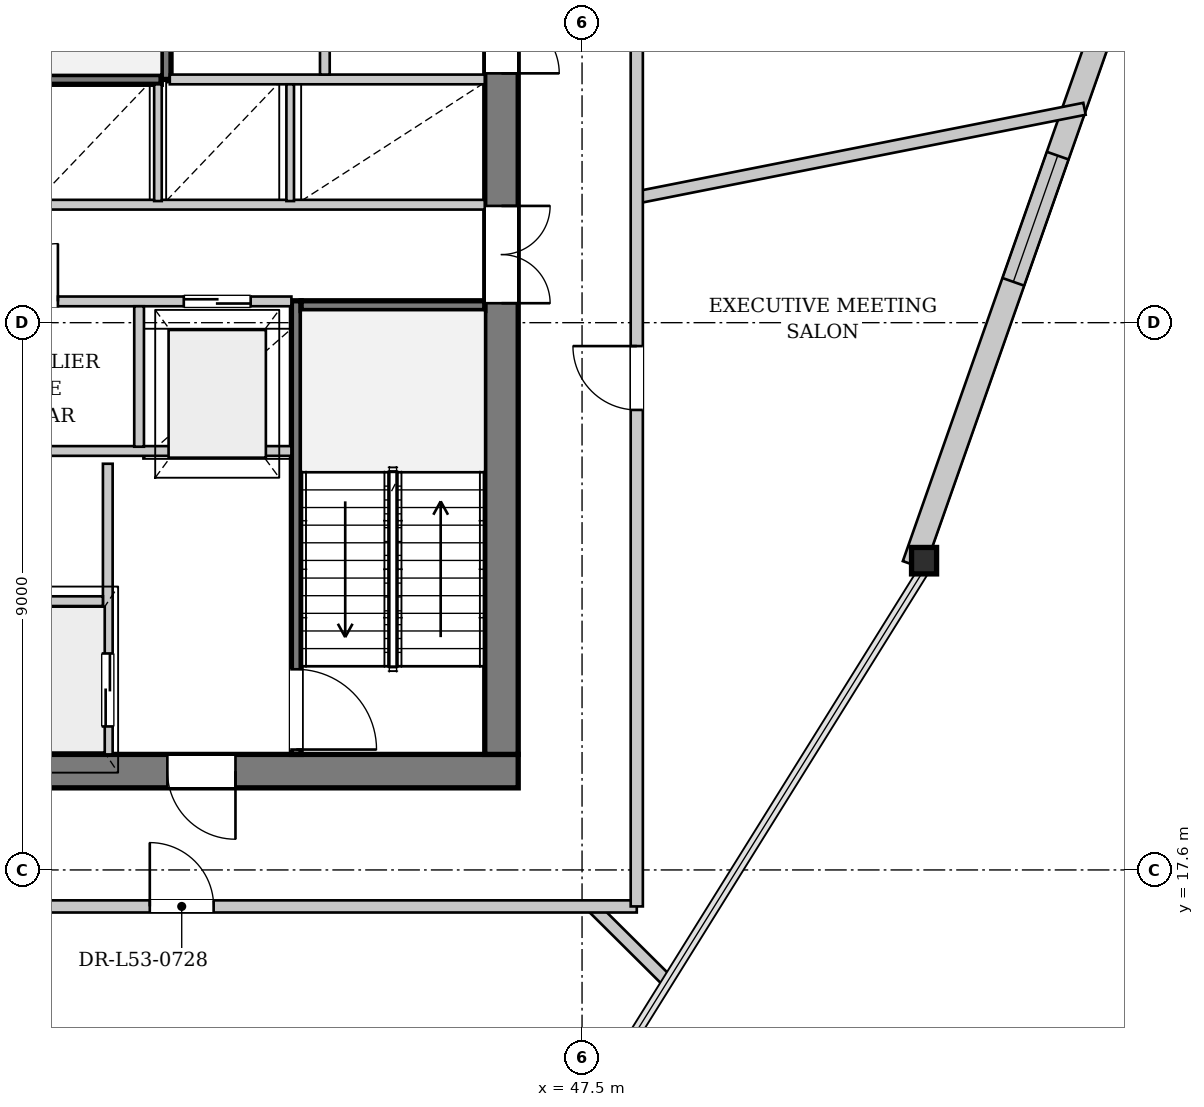
"""IFC4 building model, lengths in metres.
Left out: names, types, materials, properties, quantities, classifications, styles, units other than length and angle.
Written with IfcOpenShell. Run it as: python <this file> out.ifc"""

import sys

from ifc_helpers import new_model, si_unit, direction, frame, frame_2d, origin, origin_2d, place, context, subcontext, project, spatial, rectangle, i_section, extrude, source, transform, mapped, element, fill, save


model = new_model("IFC4")
c1 = context("Model", 3, precision=1e-05, world=origin(), true_north=direction((0.0, 1.0)))
c2 = subcontext(c1, "Body", "Model", "MODEL_VIEW")
j1 = project(units=[si_unit("LENGTHUNIT", "METRE"), si_unit("PLANEANGLEUNIT", "RADIAN")], contexts=[c1])
p1 = place(None, origin())
s1 = spatial("IfcSite", under=j1, at=p1, CompositionType="ELEMENT")
p2 = place(p1, origin())
s2 = spatial("IfcBuilding", under=s1, at=p2, CompositionType="ELEMENT")
p3 = place(p2, frame((0.0, 0.0, 200.3)))
s3 = spatial("IfcBuildingStorey", under=s2, at=p3, CompositionType="ELEMENT", Elevation=200.3)
m1 = source(origin(), c2, "Body", "SweptSolid", [
    extrude(i_section(OverallWidth=0.412, OverallDepth=0.435, WebThickness=0.031, FlangeThickness=0.05, at=origin_2d()), origin(), (0.0, 0.0, 1.0), 3.844),
])
p4 = place(p3, frame((53.134, 22.552, 0.0), z_axis=(-0.004953606094, 0.06935048531, 0.997580057927), x_axis=(-0.997458699831, -0.071247049988, 0.0)))
e1 = element("IfcColumn", 1, at=p4, inside=s3, PredefinedType="COLUMN", context=c2, shape_type="MappedRepresentation", body=[
    mapped(m1, transform((0.0, 0.0, 0.0), x_axis=(1.0, 0.0, 0.0), y_axis=(0.0, 1.0, 0.0), z_axis=(0.0, 0.0, 1.0), scale=1.0)),
])
p5 = place(p3, frame((60.64, 44.466, 0.0), z_axis=(0.0, 0.0, 1.0), x_axis=(-0.331792792619, -0.94335228985, 0.0)))
e2 = element("IfcWall", 2, at=p5, inside=s3, PredefinedType="SOLIDWALL", context=c2, shape_type="SweptSolid", body=[
    extrude(rectangle(XDim=23.163, YDim=0.38, at=frame_2d((11.582, 0.0))), origin(), (0.0, 0.0, 1.0), 2.972),
])
p6 = place(p5, frame((5.386, 0.0, 0.602)))
e3 = element("IfcOpeningElement", 3, at=p6, cuts=e2, PredefinedType="OPENING", context=c2, shape_type="SweptSolid", body=[
    extrude(rectangle(XDim=2.2, YDim=2.25, at=frame_2d((1.1, 1.125))), frame((0.0, 0.2, 0.0), z_axis=(0.0, -1.0, 0.0), x_axis=(1.0, 0.0, 0.0)), (0.0, 0.0, 1.0), 0.4),
])
p7 = place(p5, frame((16.027, 0.0, 0.602)))
e4 = element("IfcOpeningElement", 4, at=p7, cuts=e2, PredefinedType="OPENING", context=c2, shape_type="SweptSolid", body=[
    extrude(rectangle(XDim=2.2, YDim=2.25, at=frame_2d((1.1, 1.125))), frame((0.0, 0.2, 0.0), z_axis=(0.0, -1.0, 0.0), x_axis=(1.0, 0.0, 0.0)), (0.0, 0.0, 1.0), 0.4),
])
p8 = place(p3, frame((46.45, 19.225, 0.0), z_axis=(0.0, 0.0, 1.0), x_axis=(-1.0, 0.0, 0.0)))
e5 = element("IfcWall", 5, at=p8, inside=s3, PredefinedType="SHEAR", context=c2, shape_type="SweptSolid", body=[
    extrude(rectangle(XDim=16.9, YDim=0.55, at=frame_2d((8.45, 0.0))), origin(), (0.0, 0.0, 1.0), 3.58),
])
p9 = place(p8, frame((4.65, 0.0, 0.0)))
e6 = element("IfcOpeningElement", 6, at=p9, cuts=e5, PredefinedType="OPENING", context=c2, shape_type="SweptSolid", body=[
    extrude(rectangle(XDim=1.12, YDim=2.25, at=frame_2d((0.56, 1.125))), frame((0.0, 0.285, 0.0), z_axis=(0.0, -1.0, 0.0), x_axis=(1.0, 0.0, 0.0)), (0.0, 0.0, 1.0), 0.57),
])
p10 = place(p8, frame((11.15, 0.0, 0.0)))
e7 = element("IfcOpeningElement", 7, at=p10, cuts=e5, PredefinedType="OPENING", context=c2, shape_type="SweptSolid", body=[
    extrude(rectangle(XDim=1.12, YDim=2.25, at=frame_2d((0.56, 1.125))), frame((0.0, 0.285, 0.0), z_axis=(0.0, -1.0, 0.0), x_axis=(1.0, 0.0, 0.0)), (0.0, 0.0, 1.0), 0.57),
])
p11 = place(p3, frame((46.175, 33.7, 0.0), z_axis=(0.0, 0.0, 1.0), x_axis=(0.0, -1.0, 0.0)))
e8 = element("IfcWall", 8, at=p11, inside=s3, PredefinedType="SHEAR", context=c2, shape_type="SweptSolid", body=[
    extrude(rectangle(XDim=14.2, YDim=0.55, at=frame_2d((7.1, 0.0))), origin(), (0.0, 0.0, 1.0), 3.58),
])
p12 = place(p11, frame((5.18, 0.0, 0.0)))
e9 = element("IfcOpeningElement", 9, at=p12, cuts=e8, PredefinedType="OPENING", context=c2, shape_type="SweptSolid", body=[
    extrude(rectangle(XDim=1.6, YDim=2.2, at=frame_2d((0.8, 1.1))), frame((0.0, 0.285, 0.0), z_axis=(0.0, -1.0, 0.0), x_axis=(1.0, 0.0, 0.0)), (0.0, 0.0, 1.0), 0.57),
])
p13 = place(p11, frame((2.05, 0.0, 0.0)))
e10 = element("IfcOpeningElement", 10, at=p13, cuts=e8, PredefinedType="OPENING", context=c2, shape_type="SweptSolid", body=[
    extrude(rectangle(XDim=0.95, YDim=2.1, at=frame_2d((0.475, 1.05))), frame((0.0, 0.285, 0.0), z_axis=(0.0, -1.0, 0.0), x_axis=(1.0, 0.0, 0.0)), (0.0, 0.0, 1.0), 0.57),
])
p14 = place(p3, frame((42.8, 26.96, 0.0), z_axis=(0.0, 0.0, 1.0), x_axis=(0.0, -1.0, 0.0)))
e11 = element("IfcWall", 11, at=p14, inside=s3, PredefinedType="PARTITIONING", context=c2, shape_type="SweptSolid", body=[
    extrude(rectangle(XDim=7.46, YDim=0.16, at=frame_2d((3.73, 0.0))), origin(), (0.0, 0.0, 1.0), 3.58),
])
p15 = place(p14, frame((6.06, 0.0, 0.0)))
e12 = element("IfcOpeningElement", 12, at=p15, cuts=e11, PredefinedType="OPENING", context=c2, shape_type="SweptSolid", body=[
    extrude(rectangle(XDim=1.32, YDim=2.2, at=frame_2d((0.66, 1.1))), frame((0.0, 0.09, 0.0), z_axis=(0.0, -1.0, 0.0), x_axis=(1.0, 0.0, 0.0)), (0.0, 0.0, 1.0), 0.18),
])
p16 = place(p3, frame((42.88, 26.88, 0.0), z_axis=(0.0, 0.0, 1.0), x_axis=(1.0, 0.0, 0.0)))
e13 = element("IfcWall", 13, at=p16, inside=s3, PredefinedType="PARTITIONING", context=c2, shape_type="SweptSolid", body=[
    extrude(rectangle(XDim=3.02, YDim=0.16, at=frame_2d((1.51, 0.0))), origin(), (0.0, 0.0, 1.0), 3.58),
])
p17 = place(p3, frame((33.28, 30.6, 0.0), z_axis=(0.0, 0.0, 1.0), x_axis=(1.0, 0.0, 0.0)))
e14 = element("IfcWall", 14, at=p17, inside=s3, PredefinedType="PARTITIONING", context=c2, shape_type="SweptSolid", body=[
    extrude(rectangle(XDim=7.3, YDim=0.16, at=frame_2d((3.65, 0.0))), origin(), (0.0, 0.0, 1.0), 3.58),
])
p18 = place(p3, frame((40.66, 30.6, 0.0), z_axis=(0.0, 0.0, 1.0), x_axis=(0.0, 1.0, 0.0)))
e15 = element("IfcWall", 15, at=p18, inside=s3, PredefinedType="PARTITIONING", context=c2, shape_type="SweptSolid", body=[
    extrude(rectangle(XDim=3.1, YDim=0.16, at=frame_2d((1.55, 0.0))), origin(), (0.0, 0.0, 1.0), 3.58),
])
p19 = place(p3, frame((39.7, 24.28, 0.0), z_axis=(0.0, 0.0, 1.0), x_axis=(0.0, -1.0, 0.0)))
e16 = element("IfcWall", 16, at=p19, inside=s3, PredefinedType="PARTITIONING", context=c2, shape_type="SweptSolid", body=[
    extrude(rectangle(XDim=4.78, YDim=0.16, at=frame_2d((2.39, 0.0))), origin(), (0.0, 0.0, 1.0), 3.58),
])
p20 = place(p19, frame((3.12, 0.0, 0.0)))
e17 = element("IfcOpeningElement", 17, at=p20, cuts=e16, PredefinedType="OPENING", context=c2, shape_type="SweptSolid", body=[
    extrude(rectangle(XDim=1.2, YDim=2.2, at=frame_2d((0.6, 1.1))), frame((0.0, 0.09, 0.0), z_axis=(0.0, -1.0, 0.0), x_axis=(1.0, 0.0, 0.0)), (0.0, 0.0, 1.0), 0.18),
])
p21 = place(p3, frame((36.38, 22.02, 0.0), z_axis=(0.0, 0.0, 1.0), x_axis=(1.0, 0.0, 0.0)))
e18 = element("IfcWall", 18, at=p21, inside=s3, PredefinedType="PARTITIONING", context=c2, shape_type="SweptSolid", body=[
    extrude(rectangle(XDim=3.24, YDim=0.16, at=frame_2d((1.62, 0.0))), origin(), (0.0, 0.0, 1.0), 3.58),
])
p22 = place(p3, frame((33.28, 24.49, 0.0), z_axis=(0.0, 0.0, 1.0), x_axis=(1.0, 0.0, 0.0)))
e19 = element("IfcWall", 19, at=p22, inside=s3, PredefinedType="PARTITIONING", context=c2, shape_type="SweptSolid", body=[
    extrude(rectangle(XDim=9.44, YDim=0.16, at=frame_2d((4.72, 0.0))), origin(), (0.0, 0.0, 1.0), 3.58),
])
p23 = place(p22, frame((0.85, 0.0, 0.95)))
e20 = element("IfcOpeningElement", 20, at=p23, cuts=e19, PredefinedType="OPENING", context=c2, shape_type="SweptSolid", body=[
    extrude(rectangle(XDim=1.4, YDim=1.8, at=frame_2d((0.7, 0.9))), frame((0.0, 0.09, 0.0), z_axis=(0.0, -1.0, 0.0), x_axis=(1.0, 0.0, 0.0)), (0.0, 0.0, 1.0), 0.18),
])
p24 = place(p3, frame((33.28, 26.95, 0.0), z_axis=(0.0, 0.0, 1.0), x_axis=(1.0, 0.0, 0.0)))
e21 = element("IfcWall", 21, at=p24, inside=s3, PredefinedType="PARTITIONING", context=c2, shape_type="SweptSolid", body=[
    extrude(rectangle(XDim=9.44, YDim=0.16, at=frame_2d((4.72, 0.0))), origin(), (0.0, 0.0, 1.0), 3.58),
])
p25 = place(p24, frame((1.2, 0.0, 0.0)))
e22 = element("IfcOpeningElement", 22, at=p25, cuts=e21, PredefinedType="OPENING", context=c2, shape_type="SweptSolid", body=[
    extrude(rectangle(XDim=0.95, YDim=2.1, at=frame_2d((0.475, 1.05))), frame((0.0, 0.09, 0.0), z_axis=(0.0, -1.0, 0.0), x_axis=(1.0, 0.0, 0.0)), (0.0, 0.0, 1.0), 0.18),
])
p26 = place(p24, frame((4.65, 0.0, 0.0)))
e23 = element("IfcOpeningElement", 23, at=p26, cuts=e21, PredefinedType="OPENING", context=c2, shape_type="SweptSolid", body=[
    extrude(rectangle(XDim=0.95, YDim=2.1, at=frame_2d((0.475, 1.05))), frame((0.0, 0.09, 0.0), z_axis=(0.0, -1.0, 0.0), x_axis=(1.0, 0.0, 0.0)), (0.0, 0.0, 1.0), 0.18),
])
p27 = place(p24, frame((7.67, 0.0, 0.0)))
e24 = element("IfcOpeningElement", 24, at=p27, cuts=e21, PredefinedType="OPENING", context=c2, shape_type="SweptSolid", body=[
    extrude(rectangle(XDim=1.1, YDim=2.2, at=frame_2d((0.55, 1.1))), frame((0.0, 0.09, 0.0), z_axis=(0.0, -1.0, 0.0), x_axis=(1.0, 0.0, 0.0)), (0.0, 0.0, 1.0), 0.18),
])
p28 = place(p3, frame((40.215, 24.56, 0.0), z_axis=(0.0, 0.0, 1.0), x_axis=(0.0, 1.0, 0.0)))
e25 = element("IfcWall", 25, at=p28, inside=s3, PredefinedType="PARTITIONING", context=c2, shape_type="SweptSolid", body=[
    extrude(rectangle(XDim=2.31, YDim=0.16, at=frame_2d((1.155, 0.0))), origin(), (0.0, 0.0, 1.0), 3.58),
])
p29 = place(p3, frame((33.28, 28.54, 0.0), z_axis=(0.0, 0.0, 1.0), x_axis=(1.0, 0.0, 0.0)))
e26 = element("IfcWall", 26, at=p29, inside=s3, PredefinedType="PARTITIONING", context=c2, shape_type="SweptSolid", body=[
    extrude(rectangle(XDim=12.62, YDim=0.16, at=frame_2d((6.31, 0.0))), origin(), (0.0, 0.0, 1.0), 3.58),
])
p30 = place(p29, frame((0.26, 0.0, 0.0)))
e27 = element("IfcOpeningElement", 27, at=p30, cuts=e26, PredefinedType="OPENING", context=c2, shape_type="SweptSolid", body=[
    extrude(rectangle(XDim=1.1, YDim=2.2, at=frame_2d((0.55, 1.1))), frame((0.0, 0.09, 0.0), z_axis=(0.0, -1.0, 0.0), x_axis=(1.0, 0.0, 0.0)), (0.0, 0.0, 1.0), 0.18),
])
p31 = place(p29, frame((2.01, 0.0, 0.0)))
e28 = element("IfcOpeningElement", 28, at=p31, cuts=e26, PredefinedType="OPENING", context=c2, shape_type="SweptSolid", body=[
    extrude(rectangle(XDim=1.1, YDim=2.2, at=frame_2d((0.55, 1.1))), frame((0.0, 0.09, 0.0), z_axis=(0.0, -1.0, 0.0), x_axis=(1.0, 0.0, 0.0)), (0.0, 0.0, 1.0), 0.18),
])
p32 = place(p29, frame((3.76, 0.0, 0.0)))
e29 = element("IfcOpeningElement", 29, at=p32, cuts=e26, PredefinedType="OPENING", context=c2, shape_type="SweptSolid", body=[
    extrude(rectangle(XDim=1.1, YDim=2.2, at=frame_2d((0.55, 1.1))), frame((0.0, 0.09, 0.0), z_axis=(0.0, -1.0, 0.0), x_axis=(1.0, 0.0, 0.0)), (0.0, 0.0, 1.0), 0.18),
])
p33 = place(p3, frame((40.72, 30.6, 0.0), z_axis=(0.0, 0.0, 1.0), x_axis=(1.0, 0.0, 0.0)))
e30 = element("IfcWall", 30, at=p33, inside=s3, PredefinedType="PARTITIONING", context=c2, shape_type="SweptSolid", body=[
    extrude(rectangle(XDim=5.18, YDim=0.16, at=frame_2d((2.59, 0.0))), origin(), (0.0, 0.0, 1.0), 3.58),
])
for number, where, z_axis, x_axis in (
    (31, (40.525, 28.6, 0.0), (0.0, 0.0, 1.0), (0.0, 1.0, 0.0)),
    (32, (42.7, 28.6, 0.0), (0.0, 0.0, 1.0), (0.0, 1.0, 0.0)),
):
    element("IfcWall", number, at=place(p3, frame(where, z_axis=z_axis, x_axis=x_axis)), inside=s3, PredefinedType="PARTITIONING", context=c2, shape_type="SweptSolid", body=[
        extrude(rectangle(XDim=1.92, YDim=0.125, at=frame_2d((0.96, 0.0))), origin(), (0.0, 0.0, 1.0), 3.58),
    ])
p34 = place(p3, frame((43.27, 30.68, 0.0), z_axis=(0.0, 0.0, 1.0), x_axis=(0.0, 1.0, 0.0)))
e33 = element("IfcWall", 33, at=p34, inside=s3, PredefinedType="PARTITIONING", context=c2, shape_type="SweptSolid", body=[
    extrude(rectangle(XDim=3.02, YDim=0.16, at=frame_2d((1.51, 0.0))), origin(), (0.0, 0.0, 1.0), 3.58),
])
p35 = place(p34, frame((0.95, 0.0, 0.0)))
e34 = element("IfcOpeningElement", 34, at=p35, cuts=e33, PredefinedType="OPENING", context=c2, shape_type="SweptSolid", body=[
    extrude(rectangle(XDim=0.95, YDim=2.1, at=frame_2d((0.475, 1.05))), frame((0.0, 0.09, 0.0), z_axis=(0.0, -1.0, 0.0), x_axis=(1.0, 0.0, 0.0)), (0.0, 0.0, 1.0), 0.18),
])
p36 = place(p3, frame((47.667, 17.0, 0.0), z_axis=(0.0, 0.0, 1.0), x_axis=(0.709519367243, -0.704685935369, 0.0)))
e35 = element("IfcWall", 35, at=p36, inside=s3, PredefinedType="PARTITIONING", context=c2, shape_type="SweptSolid", body=[
    extrude(rectangle(XDim=1.717, YDim=0.2, at=frame_2d((0.859, 0.0))), origin(), (0.0, 0.0, 1.0), 3.58),
])
p37 = place(p3, frame((48.4, 28.659, 0.0), z_axis=(0.0, 0.0, 1.0), x_axis=(0.980954168832, 0.19423933343, 0.0)))
e36 = element("IfcWall", 36, at=p37, inside=s3, PredefinedType="PARTITIONING", context=c2, shape_type="SweptSolid", body=[
    extrude(rectangle(XDim=7.506, YDim=0.2, at=frame_2d((3.753, 0.0))), origin(), (0.0, 0.0, 1.0), 3.58),
])
p38 = place(p3, frame((27.6, 17.0, 0.0), z_axis=(0.0, 0.0, 1.0), x_axis=(1.0, 0.0, 0.0)))
e37 = element("IfcWall", 37, at=p38, inside=s3, PredefinedType="PARTITIONING", context=c2, shape_type="SweptSolid", body=[
    extrude(rectangle(XDim=20.8, YDim=0.2, at=frame_2d((10.4, 0.0))), origin(), (0.0, 0.0, 1.0), 3.58),
])
p39 = place(p38, frame((4.254, 0.0, 0.0)))
e38 = element("IfcOpeningElement", 38, at=p39, cuts=e37, PredefinedType="OPENING", context=c2, shape_type="SweptSolid", body=[
    extrude(rectangle(XDim=1.05, YDim=2.2, at=frame_2d((0.525, 1.1))), frame((0.0, 0.11, 0.0), z_axis=(0.0, -1.0, 0.0), x_axis=(1.0, 0.0, 0.0)), (0.0, 0.0, 1.0), 0.22),
])
p40 = place(p38, frame((12.791, 0.0, 0.0)))
e39 = element("IfcOpeningElement", 39, at=p40, cuts=e37, PredefinedType="OPENING", context=c2, shape_type="SweptSolid", body=[
    extrude(rectangle(XDim=1.05, YDim=2.2, at=frame_2d((0.525, 1.1))), frame((0.0, 0.11, 0.0), z_axis=(0.0, -1.0, 0.0), x_axis=(1.0, 0.0, 0.0)), (0.0, 0.0, 1.0), 0.22),
])
p41 = place(p3, frame((48.4, 17.0, 0.0), z_axis=(0.0, 0.0, 1.0), x_axis=(0.0, 1.0, 0.0)))
e40 = element("IfcWall", 40, at=p41, inside=s3, PredefinedType="PARTITIONING", context=c2, shape_type="SweptSolid", body=[
    extrude(rectangle(XDim=19.2, YDim=0.2, at=frame_2d((9.6, 0.0))), origin(), (0.0, 0.0, 1.0), 3.58),
])
p42 = place(p41, frame((8.165, 0.0, 0.0)))
e41 = element("IfcOpeningElement", 41, at=p42, cuts=e40, PredefinedType="OPENING", context=c2, shape_type="SweptSolid", body=[
    extrude(rectangle(XDim=1.05, YDim=2.2, at=frame_2d((0.525, 1.1))), frame((0.0, 0.11, 0.0), z_axis=(0.0, -1.0, 0.0), x_axis=(1.0, 0.0, 0.0)), (0.0, 0.0, 1.0), 0.22),
])
m2 = source(origin(), c2, "Body", "SweptSolid", [
    extrude(rectangle(XDim=2.2, YDim=2.25, at=frame_2d((1.1, 1.125))), frame((0.0, 0.03, 0.0), z_axis=(0.0, -1.0, 0.0), x_axis=(1.0, 0.0, 0.0)), (0.0, 0.0, 1.0), 0.06),
])
p43 = place(p7, origin())
e42 = element("IfcWindow", 42, at=p43, inside=s3, PartitioningType="SINGLE_PANEL", PredefinedType="WINDOW", context=c2, shape_type="MappedRepresentation", body=[
    mapped(m2, transform((0.0, 0.0, 0.0), x_axis=(1.0, 0.0, 0.0), y_axis=(0.0, 1.0, 0.0), z_axis=(0.0, 0.0, 1.0), scale=1.0)),
])
fill(e4, e42)
m3 = source(origin(), c2, "Body", "SweptSolid", [
    extrude(rectangle(XDim=1.12, YDim=2.25, at=frame_2d((0.56, 1.125))), frame((0.0, 0.025, 0.0), z_axis=(0.0, -1.0, 0.0), x_axis=(1.0, 0.0, 0.0)), (0.0, 0.0, 1.0), 0.05),
])
p44 = place(p9, origin())
e43 = element("IfcDoor", 43, at=p44, inside=s3, OperationType="SINGLE_SWING_LEFT", PredefinedType="DOOR", context=c2, shape_type="MappedRepresentation", body=[
    mapped(m3, transform((0.0, 0.0, 0.0), x_axis=(1.0, 0.0, 0.0), y_axis=(0.0, 1.0, 0.0), z_axis=(0.0, 0.0, 1.0), scale=1.0)),
])
fill(e6, e43)
m4 = source(origin(), c2, "Body", "SweptSolid", [
    extrude(rectangle(XDim=1.6, YDim=2.2, at=frame_2d((0.8, 1.1))), frame((0.0, 0.025, 0.0), z_axis=(0.0, -1.0, 0.0), x_axis=(1.0, 0.0, 0.0)), (0.0, 0.0, 1.0), 0.05),
])
p45 = place(p12, origin())
e44 = element("IfcDoor", 44, at=p45, inside=s3, OperationType="DOUBLE_DOOR_SINGLE_SWING", PredefinedType="DOOR", context=c2, shape_type="MappedRepresentation", body=[
    mapped(m4, transform((0.0, 0.0, 0.0), x_axis=(1.0, 0.0, 0.0), y_axis=(0.0, 1.0, 0.0), z_axis=(0.0, 0.0, 1.0), scale=1.0)),
])
fill(e9, e44)
m5 = source(origin(), c2, "Body", "SweptSolid", [
    extrude(rectangle(XDim=1.32, YDim=2.2, at=frame_2d((0.66, 1.1))), frame((0.0, 0.025, 0.0), z_axis=(0.0, -1.0, 0.0), x_axis=(1.0, 0.0, 0.0)), (0.0, 0.0, 1.0), 0.05),
])
p46 = place(p15, origin())
e45 = element("IfcDoor", 45, at=p46, inside=s3, OperationType="SINGLE_SWING_RIGHT", PredefinedType="DOOR", context=c2, shape_type="MappedRepresentation", body=[
    mapped(m5, transform((0.0, 0.0, 0.0), x_axis=(1.0, 0.0, 0.0), y_axis=(0.0, 1.0, 0.0), z_axis=(0.0, 0.0, 1.0), scale=1.0)),
])
fill(e12, e45)
m6 = source(origin(), c2, "Body", "SweptSolid", [
    extrude(rectangle(XDim=1.2, YDim=2.2, at=frame_2d((0.6, 1.1))), frame((0.0, 0.025, 0.0), z_axis=(0.0, -1.0, 0.0), x_axis=(1.0, 0.0, 0.0)), (0.0, 0.0, 1.0), 0.05),
])
p47 = place(p20, origin())
e46 = element("IfcDoor", 46, at=p47, inside=s3, OperationType="DOUBLE_DOOR_SLIDING", PredefinedType="DOOR", context=c2, shape_type="MappedRepresentation", body=[
    mapped(m6, transform((0.0, 0.0, 0.0), x_axis=(1.0, 0.0, 0.0), y_axis=(0.0, 1.0, 0.0), z_axis=(0.0, 0.0, 1.0), scale=1.0)),
])
fill(e17, e46)
m7 = source(origin(), c2, "Body", "SweptSolid", [
    extrude(rectangle(XDim=0.95, YDim=2.1, at=frame_2d((0.475, 1.05))), frame((0.0, 0.025, 0.0), z_axis=(0.0, -1.0, 0.0), x_axis=(1.0, 0.0, 0.0)), (0.0, 0.0, 1.0), 0.05),
])
p48 = place(p26, origin())
e47 = element("IfcDoor", 47, at=p48, inside=s3, OperationType="SINGLE_SWING_RIGHT", PredefinedType="DOOR", context=c2, shape_type="MappedRepresentation", body=[
    mapped(m7, transform((0.0, 0.0, 0.0), x_axis=(1.0, 0.0, 0.0), y_axis=(0.0, 1.0, 0.0), z_axis=(0.0, 0.0, 1.0), scale=1.0)),
])
fill(e23, e47)
m8 = source(origin(), c2, "Body", "SweptSolid", [
    extrude(rectangle(XDim=1.1, YDim=2.2, at=frame_2d((0.55, 1.1))), frame((0.0, 0.025, 0.0), z_axis=(0.0, -1.0, 0.0), x_axis=(1.0, 0.0, 0.0)), (0.0, 0.0, 1.0), 0.05),
])
p49 = place(p27, origin())
e48 = element("IfcDoor", 48, at=p49, inside=s3, OperationType="DOUBLE_DOOR_SLIDING", PredefinedType="DOOR", context=c2, shape_type="MappedRepresentation", body=[
    mapped(m8, transform((0.0, 0.0, 0.0), x_axis=(1.0, 0.0, 0.0), y_axis=(0.0, 1.0, 0.0), z_axis=(0.0, 0.0, 1.0), scale=1.0)),
])
fill(e24, e48)
p50 = place(p13, origin())
e49 = element("IfcDoor", 49, at=p50, inside=s3, OperationType="SINGLE_SWING_RIGHT", PredefinedType="DOOR", context=c2, shape_type="MappedRepresentation", body=[
    mapped(m7, transform((0.0, 0.0, 0.0), x_axis=(1.0, 0.0, 0.0), y_axis=(0.0, 1.0, 0.0), z_axis=(0.0, 0.0, 1.0), scale=1.0)),
])
fill(e10, e49)
m9 = source(origin(), c2, "Body", "SweptSolid", [
    extrude(rectangle(XDim=1.05, YDim=2.2, at=frame_2d((0.525, 1.1))), frame((0.0, 0.025, 0.0), z_axis=(0.0, -1.0, 0.0), x_axis=(1.0, 0.0, 0.0)), (0.0, 0.0, 1.0), 0.05),
])
p51 = place(p40, origin())
e50 = element("IfcDoor", 50, at=p51, inside=s3, OperationType="SINGLE_SWING_LEFT", PredefinedType="DOOR", context=c2, shape_type="MappedRepresentation", body=[
    mapped(m9, transform((0.0, 0.0, 0.0), x_axis=(1.0, 0.0, 0.0), y_axis=(0.0, 1.0, 0.0), z_axis=(0.0, 0.0, 1.0), scale=1.0)),
])
fill(e39, e50)
p52 = place(p42, origin())
e51 = element("IfcDoor", 51, at=p52, inside=s3, OperationType="SINGLE_SWING_RIGHT", PredefinedType="DOOR", context=c2, shape_type="MappedRepresentation", body=[
    mapped(m9, transform((0.0, 0.0, 0.0), x_axis=(1.0, 0.0, 0.0), y_axis=(0.0, 1.0, 0.0), z_axis=(0.0, 0.0, 1.0), scale=1.0)),
])
fill(e41, e51)
save(model, sys.argv[1])
